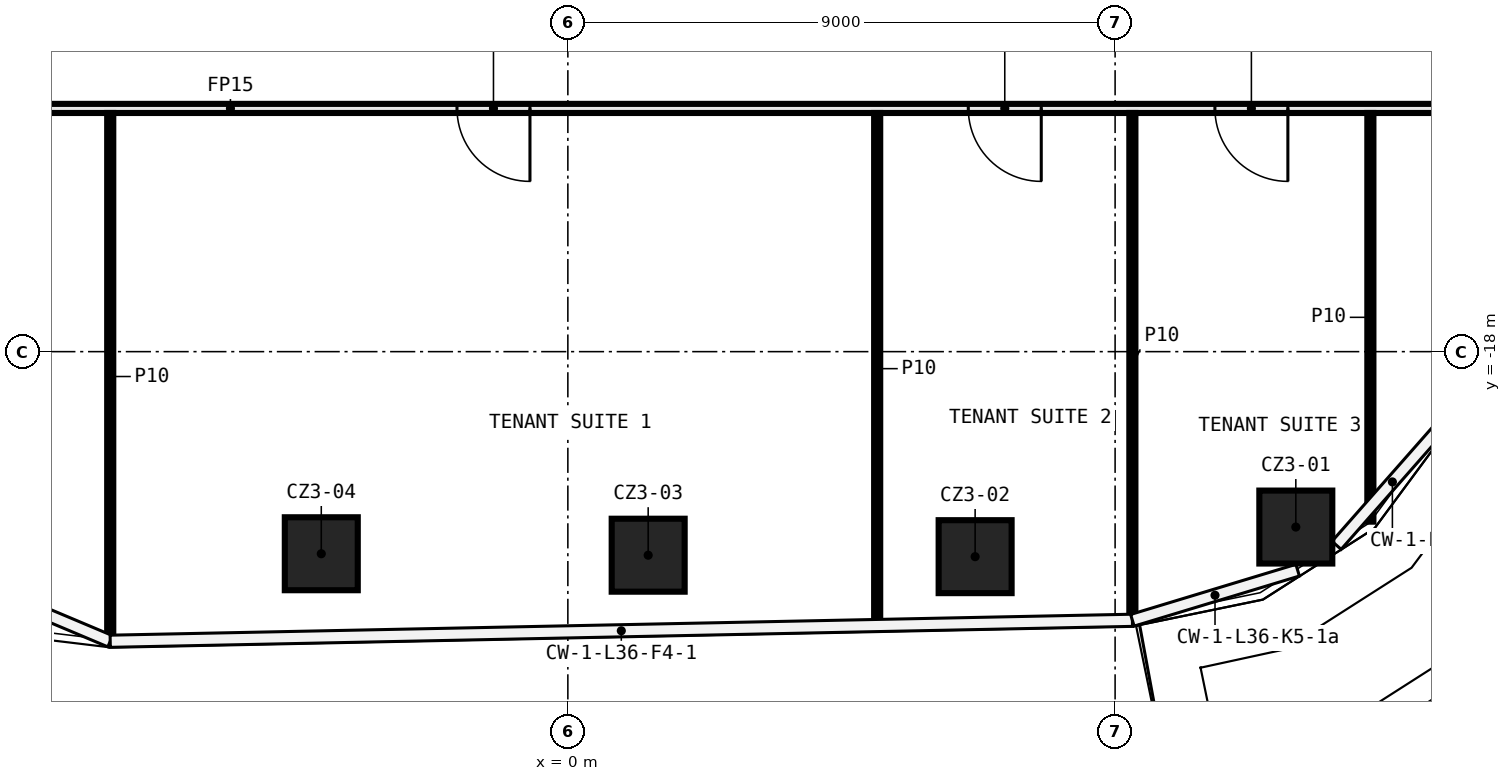
"""IFC4 building model, lengths in metres.
Left out: names, types, materials, properties, quantities, classifications, styles, units other than length and angle.
Written with IfcOpenShell. Run it as: python <this file> out.ifc"""

import sys

from ifc_helpers import new_model, si_unit, direction, frame, frame_2d, origin, origin_2d, place, context, subcontext, project, spatial, rectangle, extrude, element, fill, save


model = new_model("IFC4")
c1 = context("Model", 3, precision=1e-05, world=origin(), true_north=direction((0.0, 1.0)))
c2 = subcontext(c1, "Body", "Model", "MODEL_VIEW")
j1 = project(units=[si_unit("LENGTHUNIT", "METRE"), si_unit("PLANEANGLEUNIT", "RADIAN")], contexts=[c1])
p1 = place(None, origin())
s1 = spatial("IfcSite", under=j1, at=p1, CompositionType="ELEMENT")
p2 = place(p1, origin())
s2 = spatial("IfcBuilding", under=s1, at=p2, CompositionType="ELEMENT")
p3 = place(p2, frame((0.0, 0.0, 167.0)))
s3 = spatial("IfcBuildingStorey", under=s2, at=p3, CompositionType="ELEMENT", Elevation=167.0)
for number, where, z_axis, x_axis in (
    (1, (11.972, -20.885, 0.0), (0.0, 0.0, 1.0), (1.0, 0.0, 0.0)),
    (2, (6.698, -21.372, 0.0), (0.0, 0.0, 1.0), (1.0, 0.0, 0.0)),
    (3, (1.321, -21.348, 0.0), (0.0, 0.0, 1.0), (1.0, 0.0, 0.0)),
    (4, (-4.055, -21.324, 0.0), (0.0, 0.0, 1.0), (1.0, 0.0, 0.0)),
):
    element("IfcColumn", number, at=place(p3, frame(where, z_axis=z_axis, x_axis=x_axis)), inside=s3, PredefinedType="COLUMN", context=c2, shape_type="SweptSolid", body=[
        extrude(rectangle(XDim=1.2, YDim=1.2, at=origin_2d()), origin(), (0.0, 0.0, 1.0), 3.82),
    ])
p4 = place(p3, frame((15.165, -14.0, 0.0), z_axis=(0.0, 0.0, 1.0), x_axis=(-1.0, 0.0, 0.0)))
e5 = element("IfcWall", 5, at=p4, inside=s3, PredefinedType="PARTITIONING", context=c2, shape_type="SweptSolid", body=[
    extrude(rectangle(XDim=24.24, YDim=0.15, at=frame_2d((12.12, 0.0))), origin(), (0.0, 0.0, 1.0), 3.82),
])
p5 = place(p4, frame((15.788, 0.0, 0.0)))
e6 = element("IfcOpeningElement", 6, at=p5, cuts=e5, PredefinedType="OPENING", context=c2, shape_type="SweptSolid", body=[
    extrude(rectangle(XDim=1.2, YDim=2.1, at=frame_2d((0.6, 1.05))), frame((0.0, 0.085, 0.0), z_axis=(0.0, -1.0, 0.0), x_axis=(1.0, 0.0, 0.0)), (0.0, 0.0, 1.0), 0.17),
])
p6 = place(p4, frame((7.379, 0.0, 0.0)))
e7 = element("IfcOpeningElement", 7, at=p6, cuts=e5, PredefinedType="OPENING", context=c2, shape_type="SweptSolid", body=[
    extrude(rectangle(XDim=1.2, YDim=2.1, at=frame_2d((0.6, 1.05))), frame((0.0, 0.085, 0.0), z_axis=(0.0, -1.0, 0.0), x_axis=(1.0, 0.0, 0.0)), (0.0, 0.0, 1.0), 0.17),
])
p7 = place(p4, frame((3.323, 0.0, 0.0)))
e8 = element("IfcOpeningElement", 8, at=p7, cuts=e5, PredefinedType="OPENING", context=c2, shape_type="SweptSolid", body=[
    extrude(rectangle(XDim=1.2, YDim=2.1, at=frame_2d((0.6, 1.05))), frame((0.0, 0.085, 0.0), z_axis=(0.0, -1.0, 0.0), x_axis=(1.0, 0.0, 0.0)), (0.0, 0.0, 1.0), 0.17),
])
p8 = place(p3, frame((13.198, -20.796, 0.0), z_axis=(0.0, 0.0, 1.0), x_axis=(0.0, 1.0, 0.0)))
e9 = element("IfcWall", 9, at=p8, inside=s3, PredefinedType="PARTITIONING", context=c2, shape_type="SweptSolid", body=[
    extrude(rectangle(XDim=6.721, YDim=0.1, at=frame_2d((3.361, 0.0))), origin(), (0.0, 0.0, 1.0), 3.82),
])
p9 = place(p3, frame((9.284, -22.398, 0.0), z_axis=(0.0, 0.0, 1.0), x_axis=(0.0, 1.0, 0.0)))
e10 = element("IfcWall", 10, at=p9, inside=s3, PredefinedType="PARTITIONING", context=c2, shape_type="SweptSolid", body=[
    extrude(rectangle(XDim=8.323, YDim=0.1, at=frame_2d((4.162, 0.0))), origin(), (0.0, 0.0, 1.0), 3.82),
])
p10 = place(p3, frame((5.087, -22.485, 0.0), z_axis=(0.0, 0.0, 1.0), x_axis=(0.0, 1.0, 0.0)))
e11 = element("IfcWall", 11, at=p10, inside=s3, PredefinedType="PARTITIONING", context=c2, shape_type="SweptSolid", body=[
    extrude(rectangle(XDim=8.41, YDim=0.1, at=frame_2d((4.205, 0.0))), origin(), (0.0, 0.0, 1.0), 3.82),
])
p11 = place(p3, frame((-7.526, -22.743, 0.0), z_axis=(0.0, 0.0, 1.0), x_axis=(0.0, 1.0, 0.0)))
e12 = element("IfcWall", 12, at=p11, inside=s3, PredefinedType="PARTITIONING", context=c2, shape_type="SweptSolid", body=[
    extrude(rectangle(XDim=8.668, YDim=0.1, at=frame_2d((4.334, 0.0))), origin(), (0.0, 0.0, 1.0), 3.82),
])
p12 = place(p5, origin())
e13 = element("IfcDoor", 13, at=p12, inside=s3, OperationType="SINGLE_SWING_RIGHT", PredefinedType="DOOR", context=c2, shape_type="SweptSolid", body=[
    extrude(rectangle(XDim=1.2, YDim=2.1, at=frame_2d((0.6, 1.05))), frame((0.0, 0.025, 0.0), z_axis=(0.0, -1.0, 0.0), x_axis=(1.0, 0.0, 0.0)), (0.0, 0.0, 1.0), 0.05),
])
fill(e6, e13)
p13 = place(p6, origin())
e14 = element("IfcDoor", 14, at=p13, inside=s3, OperationType="SINGLE_SWING_LEFT", PredefinedType="DOOR", context=c2, shape_type="SweptSolid", body=[
    extrude(rectangle(XDim=1.2, YDim=2.1, at=frame_2d((0.6, 1.05))), frame((0.0, 0.025, 0.0), z_axis=(0.0, -1.0, 0.0), x_axis=(1.0, 0.0, 0.0)), (0.0, 0.0, 1.0), 0.05),
])
fill(e7, e14)
p14 = place(p7, origin())
e15 = element("IfcDoor", 15, at=p14, inside=s3, OperationType="SINGLE_SWING_RIGHT", PredefinedType="DOOR", context=c2, shape_type="SweptSolid", body=[
    extrude(rectangle(XDim=1.2, YDim=2.1, at=frame_2d((0.6, 1.05))), frame((0.0, 0.025, 0.0), z_axis=(0.0, -1.0, 0.0), x_axis=(1.0, 0.0, 0.0)), (0.0, 0.0, 1.0), 0.05),
])
fill(e8, e15)
save(model, sys.argv[1])
